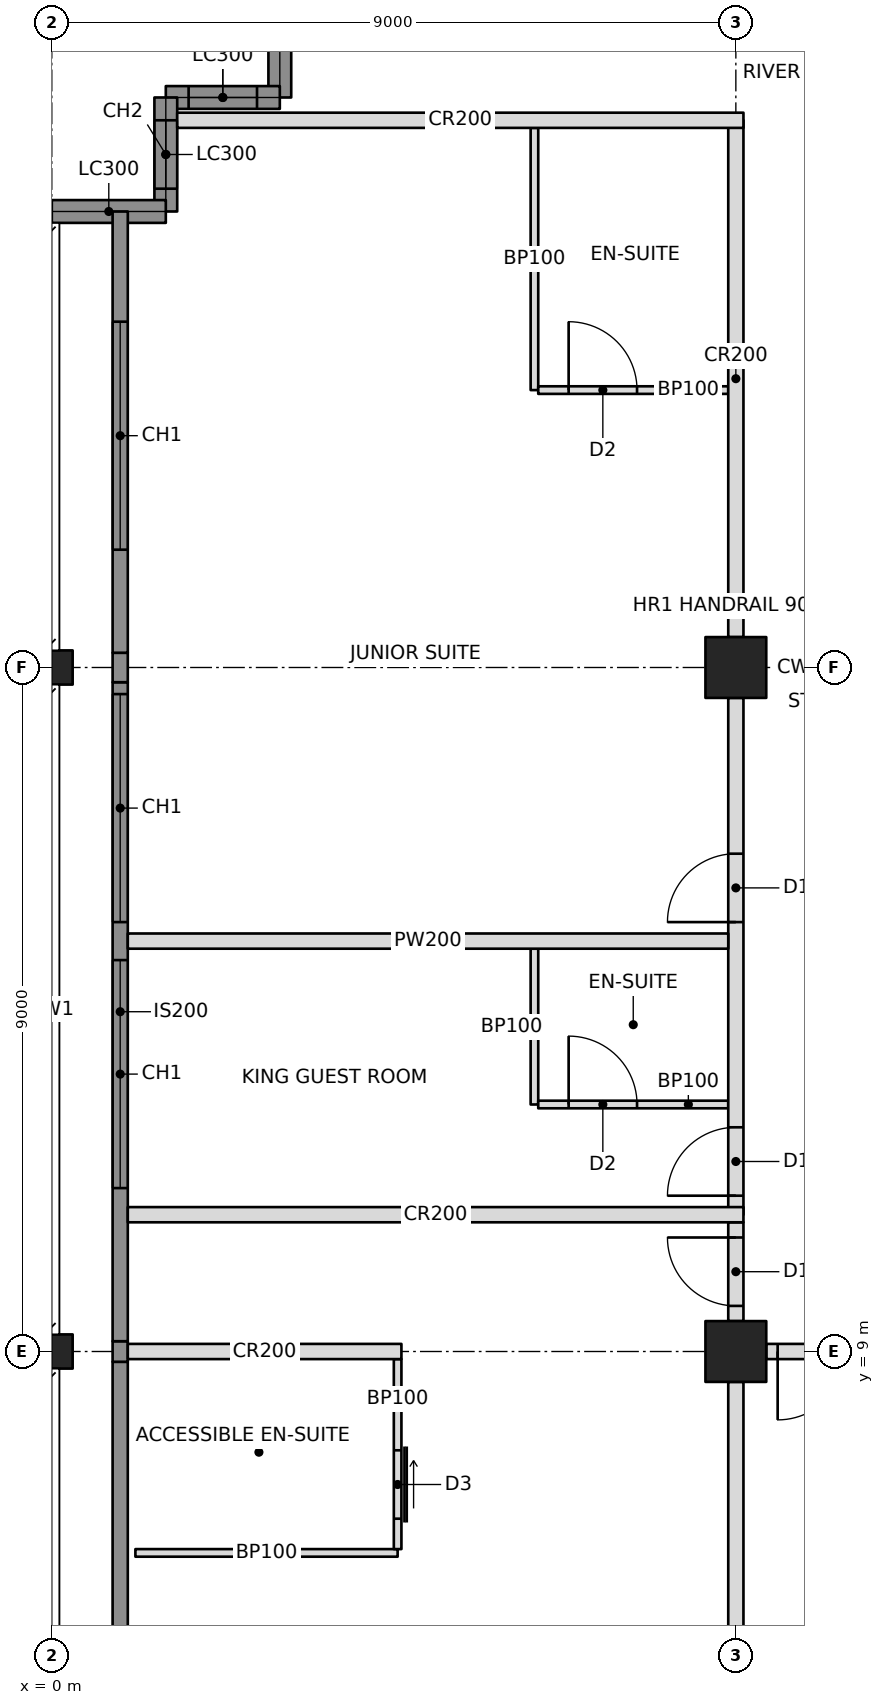
"""IFC4 building model, lengths in metres.
Left out: names, types, materials, properties, quantities, classifications, styles, units other than length and angle.
Written with IfcOpenShell. Run it as: python <this file> out.ifc"""

import sys

from ifc_helpers import new_model, si_unit, direction, frame, frame_2d, origin, origin_2d, place, context, subcontext, project, spatial, rectangle, hollow_rectangle, i_section, extrude, element, fill, save


model = new_model("IFC4")
c1 = context("Model", 3, precision=1e-05, world=origin(), true_north=direction((0.0, 1.0)))
c2 = subcontext(c1, "Body", "Model", "MODEL_VIEW")
j1 = project(units=[si_unit("LENGTHUNIT", "METRE"), si_unit("PLANEANGLEUNIT", "RADIAN")], contexts=[c1])
p1 = place(None, origin())
s1 = spatial("IfcSite", under=j1, at=p1, CompositionType="ELEMENT")
p2 = place(p1, origin())
s2 = spatial("IfcBuilding", under=s1, at=p2, CompositionType="ELEMENT")
p3 = place(p2, frame((0.0, 0.0, 177.4)))
s3 = spatial("IfcBuildingStorey", under=s2, at=p3, CompositionType="ELEMENT", Elevation=177.4)
for number, where, z_axis, x_axis in (
    (1, (0.0, 9.0, 0.0), (0.0, 0.0, 1.0), (0.0, 1.0, 0.0)),
    (2, (0.0, 18.0, 0.0), (0.0, 0.0, 1.0), (0.0, 1.0, 0.0)),
):
    element("IfcColumn", number, at=place(p3, frame(where, z_axis=z_axis, x_axis=x_axis)), inside=s3, PredefinedType="COLUMN", context=c2, shape_type="SweptSolid", body=[
        extrude(i_section(OverallWidth=0.449, OverallDepth=0.549, WebThickness=0.072, FlangeThickness=0.115, at=origin_2d()), origin(), (0.0, 0.0, 1.0), 3.4),
    ])
for number, where, z_axis, x_axis in (
    (3, (9.0, 9.0, 0.0), (0.0, 0.0, 1.0), (1.0, 0.0, 0.0)),
    (4, (9.0, 18.0, 0.0), (0.0, 0.0, 1.0), (1.0, 0.0, 0.0)),
):
    element("IfcColumn", number, at=place(p3, frame(where, z_axis=z_axis, x_axis=x_axis)), inside=s3, PredefinedType="COLUMN", context=c2, shape_type="SweptSolid", body=[
        extrude(hollow_rectangle(XDim=0.8, YDim=0.8, WallThickness=0.06, at=origin_2d()), origin(), (0.0, 0.0, 1.0), 3.4),
    ])
p4 = place(p3, frame((3.0, 27.0, 0.0), z_axis=(0.0, 0.0, 1.0), x_axis=(0.0, -1.0, 0.0)))
e5 = element("IfcWall", 5, at=p4, inside=s3, PredefinedType="SOLIDWALL", context=c2, shape_type="SweptSolid", body=[
    extrude(rectangle(XDim=1.5, YDim=0.3, at=frame_2d((0.75, 0.0))), origin(), (0.0, 0.0, 1.0), 2.42),
])
p5 = place(p3, frame((3.0, 25.5, 0.0), z_axis=(0.0, 0.0, 1.0), x_axis=(-1.0, 0.0, 0.0)))
e6 = element("IfcWall", 6, at=p5, inside=s3, PredefinedType="SOLIDWALL", context=c2, shape_type="SweptSolid", body=[
    extrude(rectangle(XDim=1.5, YDim=0.3, at=frame_2d((0.75, 0.0))), origin(), (0.0, 0.0, 1.0), 3.2),
])
p6 = place(p5, frame((0.3, 0.0, 0.6)))
e7 = element("IfcOpeningElement", 7, at=p6, cuts=e6, PredefinedType="OPENING", context=c2, shape_type="SweptSolid", body=[
    extrude(rectangle(XDim=0.9, YDim=2.2, at=frame_2d((0.45, 1.1))), frame((0.0, 0.16, 0.0), z_axis=(0.0, -1.0, 0.0), x_axis=(1.0, 0.0, 0.0)), (0.0, 0.0, 1.0), 0.32),
])
p7 = place(p3, frame((1.5, 25.5, 0.0), z_axis=(0.0, 0.0, 1.0), x_axis=(0.0, -1.0, 0.0)))
e8 = element("IfcWall", 8, at=p7, inside=s3, PredefinedType="SOLIDWALL", context=c2, shape_type="SweptSolid", body=[
    extrude(rectangle(XDim=1.5, YDim=0.3, at=frame_2d((0.75, 0.0))), origin(), (0.0, 0.0, 1.0), 3.2),
])
p8 = place(p7, frame((0.3, 0.0, 0.6)))
e9 = element("IfcOpeningElement", 9, at=p8, cuts=e8, PredefinedType="OPENING", context=c2, shape_type="SweptSolid", body=[
    extrude(rectangle(XDim=0.9, YDim=2.2, at=frame_2d((0.45, 1.1))), frame((0.0, 0.16, 0.0), z_axis=(0.0, -1.0, 0.0), x_axis=(1.0, 0.0, 0.0)), (0.0, 0.0, 1.0), 0.32),
])
p9 = place(p3, frame((1.5, 24.0, 0.0), z_axis=(0.0, 0.0, 1.0), x_axis=(-1.0, 0.0, 0.0)))
e10 = element("IfcWall", 10, at=p9, inside=s3, PredefinedType="SOLIDWALL", context=c2, shape_type="SweptSolid", body=[
    extrude(rectangle(XDim=1.5, YDim=0.3, at=frame_2d((0.75, 0.0))), origin(), (0.0, 0.0, 1.0), 2.42),
])
p10 = place(p3, frame((1.0, 9.0, 0.0), z_axis=(0.0, 0.0, 1.0), x_axis=(1.0, 0.0, 0.0)))
e11 = element("IfcWall", 11, at=p10, inside=s3, PredefinedType="PARTITIONING", context=c2, shape_type="SweptSolid", body=[
    extrude(rectangle(XDim=3.6, YDim=0.2, at=frame_2d((1.8, 0.0))), origin(), (0.0, 0.0, 1.0), 2.438),
])
p11 = place(p3, frame((9.4, 9.0, 0.0), z_axis=(0.0, 0.0, 1.0), x_axis=(1.0, 0.0, 0.0)))
e12 = element("IfcWall", 12, at=p11, inside=s3, PredefinedType="PARTITIONING", context=c2, shape_type="SweptSolid", body=[
    extrude(rectangle(XDim=8.2, YDim=0.2, at=frame_2d((4.1, 0.0))), origin(), (0.0, 0.0, 1.0), 2.405),
])
p12 = place(p11, frame((0.15, 0.0, 0.0)))
e13 = element("IfcOpeningElement", 13, at=p12, cuts=e12, PredefinedType="OPENING", context=c2, shape_type="SweptSolid", body=[
    extrude(rectangle(XDim=0.9, YDim=2.1, at=frame_2d((0.45, 1.05))), frame((0.0, 0.11, 0.0), z_axis=(0.0, -1.0, 0.0), x_axis=(1.0, 0.0, 0.0)), (0.0, 0.0, 1.0), 0.22),
])
p13 = place(p3, frame((9.0, 10.8, 0.0), z_axis=(0.0, 0.0, 1.0), x_axis=(0.0, 1.0, 0.0)))
e14 = element("IfcWall", 14, at=p13, inside=s3, PredefinedType="PARTITIONING", context=c2, shape_type="SweptSolid", body=[
    extrude(rectangle(XDim=6.8, YDim=0.2, at=frame_2d((3.4, 0.0))), origin(), (0.0, 0.0, 1.0), 2.405),
])
p14 = place(p13, frame((0.25, 0.0, 0.0)))
e15 = element("IfcOpeningElement", 15, at=p14, cuts=e14, PredefinedType="OPENING", context=c2, shape_type="SweptSolid", body=[
    extrude(rectangle(XDim=0.9, YDim=2.1, at=frame_2d((0.45, 1.05))), frame((0.0, 0.11, 0.0), z_axis=(0.0, -1.0, 0.0), x_axis=(1.0, 0.0, 0.0)), (0.0, 0.0, 1.0), 0.22),
])
p15 = place(p13, frame((3.85, 0.0, 0.0)))
e16 = element("IfcOpeningElement", 16, at=p15, cuts=e14, PredefinedType="OPENING", context=c2, shape_type="SweptSolid", body=[
    extrude(rectangle(XDim=0.9, YDim=2.1, at=frame_2d((0.45, 1.05))), frame((0.0, 0.11, 0.0), z_axis=(0.0, -1.0, 0.0), x_axis=(1.0, 0.0, 0.0)), (0.0, 0.0, 1.0), 0.22),
])
p16 = place(p3, frame((9.0, 18.4, 0.0), z_axis=(0.0, 0.0, 1.0), x_axis=(0.0, 1.0, 0.0)))
e17 = element("IfcWall", 17, at=p16, inside=s3, PredefinedType="PARTITIONING", context=c2, shape_type="SweptSolid", body=[
    extrude(rectangle(XDim=6.8, YDim=0.2, at=frame_2d((3.4, 0.0))), origin(), (0.0, 0.0, 1.0), 2.405),
])
p17 = place(p3, frame((1.0, 10.8, 0.0), z_axis=(0.0, 0.0, 1.0), x_axis=(1.0, 0.0, 0.0)))
e18 = element("IfcWall", 18, at=p17, inside=s3, PredefinedType="PARTITIONING", context=c2, shape_type="SweptSolid", body=[
    extrude(rectangle(XDim=8.1, YDim=0.2, at=frame_2d((4.05, 0.0))), origin(), (0.0, 0.0, 1.0), 2.404),
])
p18 = place(p3, frame((1.65, 25.2, 0.0), z_axis=(0.0, 0.0, 1.0), x_axis=(1.0, 0.0, 0.0)))
e19 = element("IfcWall", 19, at=p18, inside=s3, PredefinedType="PARTITIONING", context=c2, shape_type="SweptSolid", body=[
    extrude(rectangle(XDim=7.45, YDim=0.2, at=frame_2d((3.725, 0.0))), origin(), (0.0, 0.0, 1.0), 2.404),
])
p19 = place(p3, frame((9.0, 8.6, 0.0), z_axis=(0.0, 0.0, 1.0), x_axis=(0.0, -1.0, 0.0)))
e20 = element("IfcWall", 20, at=p19, inside=s3, PredefinedType="PARTITIONING", context=c2, shape_type="SweptSolid", body=[
    extrude(rectangle(XDim=7.6, YDim=0.2, at=frame_2d((3.8, 0.0))), origin(), (0.0, 0.0, 1.0), 2.438),
])
p20 = place(p3, frame((1.1, 6.35, 0.0), z_axis=(0.0, 0.0, 1.0), x_axis=(1.0, 0.0, 0.0)))
e21 = element("IfcWall", 21, at=p20, inside=s3, PredefinedType="PARTITIONING", context=c2, shape_type="SweptSolid", body=[
    extrude(rectangle(XDim=3.45, YDim=0.1, at=frame_2d((1.725, 0.0))), origin(), (0.0, 0.0, 1.0), 3.2),
])
p21 = place(p3, frame((4.55, 8.9, 0.0), z_axis=(0.0, 0.0, 1.0), x_axis=(0.0, -1.0, 0.0)))
e22 = element("IfcWall", 22, at=p21, inside=s3, PredefinedType="PARTITIONING", context=c2, shape_type="SweptSolid", body=[
    extrude(rectangle(XDim=2.5, YDim=0.1, at=frame_2d((1.25, 0.0))), origin(), (0.0, 0.0, 1.0), 2.438),
])
p22 = place(p21, frame((1.2, 0.0, 0.0)))
e23 = element("IfcOpeningElement", 23, at=p22, cuts=e22, PredefinedType="OPENING", context=c2, shape_type="SweptSolid", body=[
    extrude(rectangle(XDim=0.9, YDim=2.1, at=frame_2d((0.45, 1.05))), frame((0.0, 0.06, 0.0), z_axis=(0.0, -1.0, 0.0), x_axis=(1.0, 0.0, 0.0)), (0.0, 0.0, 1.0), 0.12),
])
p23 = place(p3, frame((8.9, 14.4, 0.0), z_axis=(0.0, 0.0, 1.0), x_axis=(-1.0, 0.0, 0.0)))
e24 = element("IfcWall", 24, at=p23, inside=s3, PredefinedType="PARTITIONING", context=c2, shape_type="SweptSolid", body=[
    extrude(rectangle(XDim=7.9, YDim=0.2, at=frame_2d((3.95, 0.0))), origin(), (0.0, 0.0, 1.0), 2.404),
])
p24 = place(p3, frame((6.35, 12.25, 0.0), z_axis=(0.0, 0.0, 1.0), x_axis=(0.0, 1.0, 0.0)))
e25 = element("IfcWall", 25, at=p24, inside=s3, PredefinedType="PARTITIONING", context=c2, shape_type="SweptSolid", body=[
    extrude(rectangle(XDim=2.05, YDim=0.1, at=frame_2d((1.025, 0.0))), origin(), (0.0, 0.0, 1.0), 3.2),
])
p25 = place(p3, frame((8.9, 12.25, 0.0), z_axis=(0.0, 0.0, 1.0), x_axis=(-1.0, 0.0, 0.0)))
e26 = element("IfcWall", 26, at=p25, inside=s3, PredefinedType="PARTITIONING", context=c2, shape_type="SweptSolid", body=[
    extrude(rectangle(XDim=2.5, YDim=0.1, at=frame_2d((1.25, 0.0))), origin(), (0.0, 0.0, 1.0), 2.404),
])
p26 = place(p25, frame((1.2, 0.0, 0.0)))
e27 = element("IfcOpeningElement", 27, at=p26, cuts=e26, PredefinedType="OPENING", context=c2, shape_type="SweptSolid", body=[
    extrude(rectangle(XDim=0.9, YDim=2.1, at=frame_2d((0.45, 1.05))), frame((0.0, 0.06, 0.0), z_axis=(0.0, -1.0, 0.0), x_axis=(1.0, 0.0, 0.0)), (0.0, 0.0, 1.0), 0.12),
])
p27 = place(p3, frame((6.35, 21.65, 0.0), z_axis=(0.0, 0.0, 1.0), x_axis=(0.0, 1.0, 0.0)))
e28 = element("IfcWall", 28, at=p27, inside=s3, PredefinedType="PARTITIONING", context=c2, shape_type="SweptSolid", body=[
    extrude(rectangle(XDim=3.45, YDim=0.1, at=frame_2d((1.725, 0.0))), origin(), (0.0, 0.0, 1.0), 3.2),
])
p28 = place(p3, frame((8.9, 21.65, 0.0), z_axis=(0.0, 0.0, 1.0), x_axis=(-1.0, 0.0, 0.0)))
e29 = element("IfcWall", 29, at=p28, inside=s3, PredefinedType="PARTITIONING", context=c2, shape_type="SweptSolid", body=[
    extrude(rectangle(XDim=2.5, YDim=0.1, at=frame_2d((1.25, 0.0))), origin(), (0.0, 0.0, 1.0), 2.404),
])
p29 = place(p28, frame((1.2, 0.0, 0.0)))
e30 = element("IfcOpeningElement", 30, at=p29, cuts=e29, PredefinedType="OPENING", context=c2, shape_type="SweptSolid", body=[
    extrude(rectangle(XDim=0.9, YDim=2.1, at=frame_2d((0.45, 1.05))), frame((0.0, 0.06, 0.0), z_axis=(0.0, -1.0, 0.0), x_axis=(1.0, 0.0, 0.0)), (0.0, 0.0, 1.0), 0.12),
])
p30 = place(p3, frame((9.0, 9.4, 0.0), z_axis=(0.0, 0.0, 1.0), x_axis=(0.0, 1.0, 0.0)))
e31 = element("IfcWall", 31, at=p30, inside=s3, PredefinedType="PARTITIONING", context=c2, shape_type="SweptSolid", body=[
    extrude(rectangle(XDim=1.3, YDim=0.2, at=frame_2d((0.65, 0.0))), origin(), (0.0, 0.0, 1.0), 2.405),
])
p31 = place(p30, frame((0.2, 0.0, 0.0)))
e32 = element("IfcOpeningElement", 32, at=p31, cuts=e31, PredefinedType="OPENING", context=c2, shape_type="SweptSolid", body=[
    extrude(rectangle(XDim=0.9, YDim=2.1, at=frame_2d((0.45, 1.05))), frame((0.0, 0.11, 0.0), z_axis=(0.0, -1.0, 0.0), x_axis=(1.0, 0.0, 0.0)), (0.0, 0.0, 1.0), 0.22),
])
p32 = place(p3, frame((0.9, 4.607, 0.0), z_axis=(0.0, 0.0, 1.0), x_axis=(0.0, 1.0, 0.0)))
e33 = element("IfcWall", 33, at=p32, inside=s3, PredefinedType="SOLIDWALL", context=c2, shape_type="SweptSolid", body=[
    extrude(rectangle(XDim=4.257, YDim=0.2, at=frame_2d((2.129, 0.0))), origin(), (0.0, 0.0, 1.0), 3.2),
])
p33 = place(p3, frame((0.9, 8.865, 0.0), z_axis=(0.0, 0.0, 1.0), x_axis=(0.0, 1.0, 0.0)))
e34 = element("IfcWall", 34, at=p33, inside=s3, PredefinedType="SOLIDWALL", context=c2, shape_type="SweptSolid", body=[
    extrude(rectangle(XDim=0.271, YDim=0.2, at=frame_2d((0.135, 0.0))), origin(), (0.0, 0.0, 1.0), 2.438),
])
p34 = place(p3, frame((0.9, 9.135, 0.0), z_axis=(0.0, 0.0, 1.0), x_axis=(0.0, 1.0, 0.0)))
e35 = element("IfcWall", 35, at=p34, inside=s3, PredefinedType="SOLIDWALL", context=c2, shape_type="SweptSolid", body=[
    extrude(rectangle(XDim=8.671, YDim=0.2, at=frame_2d((4.335, 0.0))), origin(), (0.0, 0.0, 1.0), 3.2),
])
p35 = place(p34, frame((2.015, 0.0, 0.6)))
e36 = element("IfcOpeningElement", 36, at=p35, cuts=e35, PredefinedType="OPENING", context=c2, shape_type="SweptSolid", body=[
    extrude(rectangle(XDim=3.0, YDim=2.2, at=frame_2d((1.5, 1.1))), frame((0.0, 0.11, 0.0), z_axis=(0.0, -1.0, 0.0), x_axis=(1.0, 0.0, 0.0)), (0.0, 0.0, 1.0), 0.22),
])
p36 = place(p34, frame((5.515, 0.0, 0.6)))
e37 = element("IfcOpeningElement", 37, at=p36, cuts=e35, PredefinedType="OPENING", context=c2, shape_type="SweptSolid", body=[
    extrude(rectangle(XDim=3.0, YDim=2.2, at=frame_2d((1.5, 1.1))), frame((0.0, 0.11, 0.0), z_axis=(0.0, -1.0, 0.0), x_axis=(1.0, 0.0, 0.0)), (0.0, 0.0, 1.0), 0.22),
])
p37 = place(p3, frame((0.9, 17.806, 0.0), z_axis=(0.0, 0.0, 1.0), x_axis=(0.0, 1.0, 0.0)))
e38 = element("IfcWall", 38, at=p37, inside=s3, PredefinedType="SOLIDWALL", context=c2, shape_type="SweptSolid", body=[
    extrude(rectangle(XDim=0.388, YDim=0.2, at=frame_2d((0.194, 0.0))), origin(), (0.0, 0.0, 1.0), 2.404),
])
p38 = place(p3, frame((0.9, 18.194, 0.0), z_axis=(0.0, 0.0, 1.0), x_axis=(0.0, 1.0, 0.0)))
e39 = element("IfcWall", 39, at=p38, inside=s3, PredefinedType="SOLIDWALL", context=c2, shape_type="SweptSolid", body=[
    extrude(rectangle(XDim=5.806, YDim=0.2, at=frame_2d((2.903, 0.0))), origin(), (0.0, 0.0, 1.0), 3.2),
])
p39 = place(p38, frame((1.356, 0.0, 0.6)))
e40 = element("IfcOpeningElement", 40, at=p39, cuts=e39, PredefinedType="OPENING", context=c2, shape_type="SweptSolid", body=[
    extrude(rectangle(XDim=3.0, YDim=2.2, at=frame_2d((1.5, 1.1))), frame((0.0, 0.11, 0.0), z_axis=(0.0, -1.0, 0.0), x_axis=(1.0, 0.0, 0.0)), (0.0, 0.0, 1.0), 0.22),
])
p40 = place(p6, origin())
e41 = element("IfcWindow", 41, at=p40, inside=s3, PartitioningType="SINGLE_PANEL", PredefinedType="WINDOW", context=c2, shape_type="SweptSolid", body=[
    extrude(rectangle(XDim=0.9, YDim=2.2, at=frame_2d((0.45, 1.1))), frame((0.0, 0.03, 0.0), z_axis=(0.0, -1.0, 0.0), x_axis=(1.0, 0.0, 0.0)), (0.0, 0.0, 1.0), 0.06),
])
fill(e7, e41)
p41 = place(p8, origin())
e42 = element("IfcWindow", 42, at=p41, inside=s3, PartitioningType="SINGLE_PANEL", PredefinedType="WINDOW", context=c2, shape_type="SweptSolid", body=[
    extrude(rectangle(XDim=0.9, YDim=2.2, at=frame_2d((0.45, 1.1))), frame((0.0, 0.03, 0.0), z_axis=(0.0, -1.0, 0.0), x_axis=(1.0, 0.0, 0.0)), (0.0, 0.0, 1.0), 0.06),
])
fill(e9, e42)
p42 = place(p35, origin())
e43 = element("IfcWindow", 43, at=p42, inside=s3, PartitioningType="TRIPLE_PANEL_VERTICAL", PredefinedType="WINDOW", context=c2, shape_type="SweptSolid", body=[
    extrude(rectangle(XDim=3.0, YDim=2.2, at=frame_2d((1.5, 1.1))), frame((0.0, 0.03, 0.0), z_axis=(0.0, -1.0, 0.0), x_axis=(1.0, 0.0, 0.0)), (0.0, 0.0, 1.0), 0.06),
])
fill(e36, e43)
p43 = place(p36, origin())
e44 = element("IfcWindow", 44, at=p43, inside=s3, PartitioningType="TRIPLE_PANEL_VERTICAL", PredefinedType="WINDOW", context=c2, shape_type="SweptSolid", body=[
    extrude(rectangle(XDim=3.0, YDim=2.2, at=frame_2d((1.5, 1.1))), frame((0.0, 0.03, 0.0), z_axis=(0.0, -1.0, 0.0), x_axis=(1.0, 0.0, 0.0)), (0.0, 0.0, 1.0), 0.06),
])
fill(e37, e44)
p44 = place(p39, origin())
e45 = element("IfcWindow", 45, at=p44, inside=s3, PartitioningType="TRIPLE_PANEL_VERTICAL", PredefinedType="WINDOW", context=c2, shape_type="SweptSolid", body=[
    extrude(rectangle(XDim=3.0, YDim=2.2, at=frame_2d((1.5, 1.1))), frame((0.0, 0.03, 0.0), z_axis=(0.0, -1.0, 0.0), x_axis=(1.0, 0.0, 0.0)), (0.0, 0.0, 1.0), 0.06),
])
fill(e40, e45)
p45 = place(p22, origin())
e46 = element("IfcDoor", 46, at=p45, inside=s3, OperationType="SLIDING_TO_LEFT", PredefinedType="DOOR", context=c2, shape_type="SweptSolid", body=[
    extrude(rectangle(XDim=0.9, YDim=2.1, at=frame_2d((0.45, 1.05))), frame((0.0, 0.025, 0.0), z_axis=(0.0, -1.0, 0.0), x_axis=(1.0, 0.0, 0.0)), (0.0, 0.0, 1.0), 0.05),
])
fill(e23, e46)
p46 = place(p12, frame((0.9, 0.0, 0.0), z_axis=(0.0, 0.0, 1.0), x_axis=(-1.0, 0.0, 0.0)))
e47 = element("IfcDoor", 47, at=p46, inside=s3, OperationType="SINGLE_SWING_RIGHT", PredefinedType="DOOR", context=c2, shape_type="SweptSolid", body=[
    extrude(rectangle(XDim=0.9, YDim=2.1, at=frame_2d((0.45, 1.05))), frame((0.0, 0.025, 0.0), z_axis=(0.0, -1.0, 0.0), x_axis=(1.0, 0.0, 0.0)), (0.0, 0.0, 1.0), 0.05),
])
fill(e13, e47)
p47 = place(p26, frame((0.9, 0.0, 0.0), z_axis=(0.0, 0.0, 1.0), x_axis=(-1.0, 0.0, 0.0)))
e48 = element("IfcDoor", 48, at=p47, inside=s3, OperationType="SINGLE_SWING_LEFT", PredefinedType="DOOR", context=c2, shape_type="SweptSolid", body=[
    extrude(rectangle(XDim=0.9, YDim=2.1, at=frame_2d((0.45, 1.05))), frame((0.0, 0.025, 0.0), z_axis=(0.0, -1.0, 0.0), x_axis=(1.0, 0.0, 0.0)), (0.0, 0.0, 1.0), 0.05),
])
fill(e27, e48)
p48 = place(p14, origin())
e49 = element("IfcDoor", 49, at=p48, inside=s3, OperationType="SINGLE_SWING_LEFT", PredefinedType="DOOR", context=c2, shape_type="SweptSolid", body=[
    extrude(rectangle(XDim=0.9, YDim=2.1, at=frame_2d((0.45, 1.05))), frame((0.0, 0.025, 0.0), z_axis=(0.0, -1.0, 0.0), x_axis=(1.0, 0.0, 0.0)), (0.0, 0.0, 1.0), 0.05),
])
fill(e15, e49)
p49 = place(p29, frame((0.9, 0.0, 0.0), z_axis=(0.0, 0.0, 1.0), x_axis=(-1.0, 0.0, 0.0)))
e50 = element("IfcDoor", 50, at=p49, inside=s3, OperationType="SINGLE_SWING_LEFT", PredefinedType="DOOR", context=c2, shape_type="SweptSolid", body=[
    extrude(rectangle(XDim=0.9, YDim=2.1, at=frame_2d((0.45, 1.05))), frame((0.0, 0.025, 0.0), z_axis=(0.0, -1.0, 0.0), x_axis=(1.0, 0.0, 0.0)), (0.0, 0.0, 1.0), 0.05),
])
fill(e30, e50)
p50 = place(p15, origin())
e51 = element("IfcDoor", 51, at=p50, inside=s3, OperationType="SINGLE_SWING_LEFT", PredefinedType="DOOR", context=c2, shape_type="SweptSolid", body=[
    extrude(rectangle(XDim=0.9, YDim=2.1, at=frame_2d((0.45, 1.05))), frame((0.0, 0.025, 0.0), z_axis=(0.0, -1.0, 0.0), x_axis=(1.0, 0.0, 0.0)), (0.0, 0.0, 1.0), 0.05),
])
fill(e16, e51)
p51 = place(p31, origin())
e52 = element("IfcDoor", 52, at=p51, inside=s3, OperationType="SINGLE_SWING_RIGHT", PredefinedType="DOOR", context=c2, shape_type="SweptSolid", body=[
    extrude(rectangle(XDim=0.9, YDim=2.1, at=frame_2d((0.45, 1.05))), frame((0.0, 0.025, 0.0), z_axis=(0.0, -1.0, 0.0), x_axis=(1.0, 0.0, 0.0)), (0.0, 0.0, 1.0), 0.05),
])
fill(e32, e52)
save(model, sys.argv[1])
